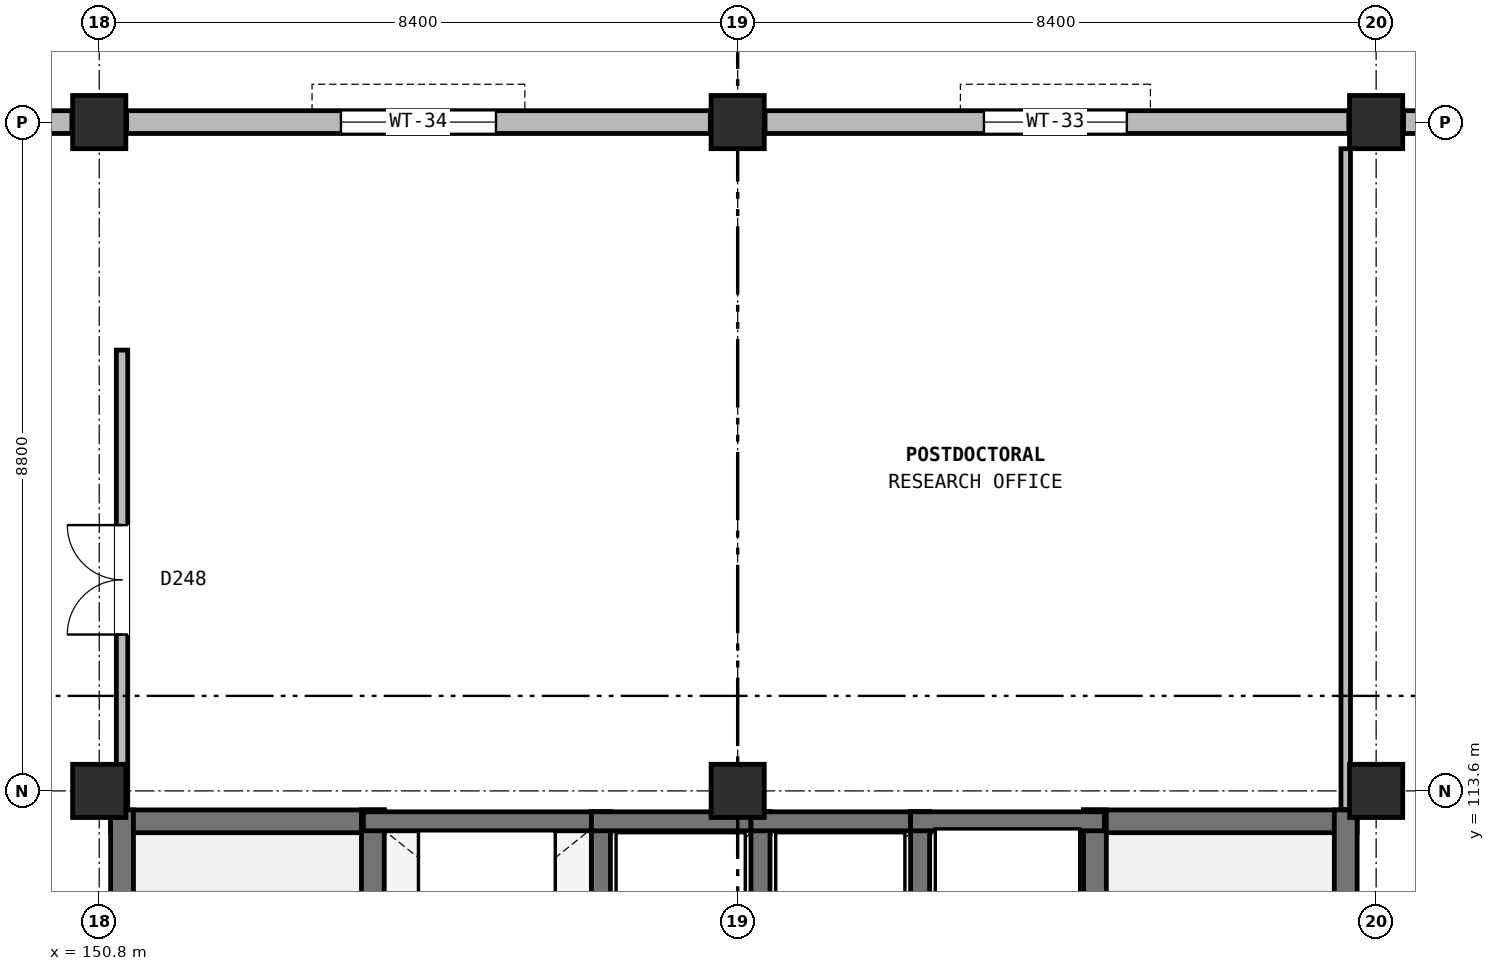
"""IFC4 building model, lengths in metres.
Left out: names, types, materials, properties, quantities, classifications, styles, units other than length and angle.
Written with IfcOpenShell. Run it as: python <this file> out.ifc"""

import sys

from ifc_helpers import new_model, si_unit, direction, frame, frame_2d, origin, origin_2d, place, context, subcontext, project, spatial, rectangle, extrude, element, fill, save


model = new_model("IFC4")
c1 = context("Model", 3, precision=1e-05, world=origin(), true_north=direction((0.0, 1.0)))
c2 = subcontext(c1, "Body", "Model", "MODEL_VIEW")
j1 = project(units=[si_unit("LENGTHUNIT", "METRE"), si_unit("PLANEANGLEUNIT", "RADIAN")], contexts=[c1])
p1 = place(None, origin())
s1 = spatial("IfcSite", under=j1, at=p1, CompositionType="ELEMENT")
p2 = place(p1, origin())
s2 = spatial("IfcBuilding", under=s1, at=p2, CompositionType="ELEMENT")
p3 = place(p2, frame((0.0, 0.0, 40.6)))
s3 = spatial("IfcBuildingStorey", under=s2, at=p3, CompositionType="ELEMENT", Elevation=40.6)
for number, where, z_axis, x_axis in (
    (1, (150.8, 113.6, 0.0), (0.0, 0.0, 1.0), (1.0, 0.0, 0.0)),
    (2, (150.8, 122.4, 0.0), (0.0, 0.0, 1.0), (1.0, 0.0, 0.0)),
    (3, (159.2, 113.6, 0.0), (0.0, 0.0, 1.0), (1.0, 0.0, 0.0)),
    (4, (159.2, 122.4, 0.0), (0.0, 0.0, 1.0), (1.0, 0.0, 0.0)),
    (5, (167.6, 113.6, 0.0), (0.0, 0.0, 1.0), (1.0, 0.0, 0.0)),
    (6, (167.6, 122.4, 0.0), (0.0, 0.0, 1.0), (1.0, 0.0, 0.0)),
):
    element("IfcColumn", number, at=place(p3, frame(where, z_axis=z_axis, x_axis=x_axis)), inside=s3, PredefinedType="COLUMN", context=c2, shape_type="SweptSolid", body=[
        extrude(rectangle(XDim=0.7, YDim=0.7, at=origin_2d()), origin(), (0.0, 0.0, 1.0), 3.8),
    ])
p4 = place(p3, frame((175.64, 122.4, 0.0), z_axis=(0.0, 0.0, 1.0), x_axis=(-1.0, 0.0, 0.0)))
e7 = element("IfcWall", 7, at=p4, inside=s3, PredefinedType="SOLIDWALL", context=c2, shape_type="SweptSolid", body=[
    extrude(rectangle(XDim=7.68, YDim=0.3, at=frame_2d((3.84, 0.0))), origin(), (0.0, 0.0, 1.0), 3.05),
])
p5 = place(p4, frame((1.16, 0.0, 0.9)))
e8 = element("IfcOpeningElement", 8, at=p5, cuts=e7, PredefinedType="OPENING", context=c2, shape_type="SweptSolid", body=[
    extrude(rectangle(XDim=1.72, YDim=1.92, at=frame_2d((0.86, 0.96))), frame((0.0, 0.16, 0.0), z_axis=(0.0, -1.0, 0.0), x_axis=(1.0, 0.0, 0.0)), (0.0, 0.0, 1.0), 0.32),
])
p6 = place(p3, frame((167.24, 122.4, 0.0), z_axis=(0.0, 0.0, 1.0), x_axis=(-1.0, 0.0, 0.0)))
e9 = element("IfcWall", 9, at=p6, inside=s3, PredefinedType="SOLIDWALL", context=c2, shape_type="SweptSolid", body=[
    extrude(rectangle(XDim=7.68, YDim=0.3, at=frame_2d((3.84, 0.0))), origin(), (0.0, 0.0, 1.0), 3.05),
])
p7 = place(p6, frame((2.92, 0.0, 0.9)))
e10 = element("IfcOpeningElement", 10, at=p7, cuts=e9, PredefinedType="OPENING", context=c2, shape_type="SweptSolid", body=[
    extrude(rectangle(XDim=1.88, YDim=1.96, at=frame_2d((0.94, 0.98))), frame((0.0, 0.16, 0.0), z_axis=(0.0, -1.0, 0.0), x_axis=(1.0, 0.0, 0.0)), (0.0, 0.0, 1.0), 0.32),
])
p8 = place(p3, frame((158.84, 122.4, 0.0), z_axis=(0.0, 0.0, 1.0), x_axis=(-1.0, 0.0, 0.0)))
e11 = element("IfcWall", 11, at=p8, inside=s3, PredefinedType="SOLIDWALL", context=c2, shape_type="SweptSolid", body=[
    extrude(rectangle(XDim=7.68, YDim=0.3, at=frame_2d((3.84, 0.0))), origin(), (0.0, 0.0, 1.0), 3.05),
])
p9 = place(p8, frame((2.82, 0.0, 0.9)))
e12 = element("IfcOpeningElement", 12, at=p9, cuts=e11, PredefinedType="OPENING", context=c2, shape_type="SweptSolid", body=[
    extrude(rectangle(XDim=2.04, YDim=1.98, at=frame_2d((1.02, 0.99))), frame((0.0, 0.16, 0.0), z_axis=(0.0, -1.0, 0.0), x_axis=(1.0, 0.0, 0.0)), (0.0, 0.0, 1.0), 0.32),
])
p10 = place(p3, frame((150.44, 122.4, 0.0), z_axis=(0.0, 0.0, 1.0), x_axis=(-1.0, 0.0, 0.0)))
e13 = element("IfcWall", 13, at=p10, inside=s3, PredefinedType="SOLIDWALL", context=c2, shape_type="SweptSolid", body=[
    extrude(rectangle(XDim=7.68, YDim=0.3, at=frame_2d((3.84, 0.0))), origin(), (0.0, 0.0, 1.0), 3.05),
])
p11 = place(p10, frame((2.54, 0.0, 0.9)))
e14 = element("IfcOpeningElement", 14, at=p11, cuts=e13, PredefinedType="OPENING", context=c2, shape_type="SweptSolid", body=[
    extrude(rectangle(XDim=2.6, YDim=2.0, at=frame_2d((1.3, 1.0))), frame((0.0, 0.16, 0.0), z_axis=(0.0, -1.0, 0.0), x_axis=(1.0, 0.0, 0.0)), (0.0, 0.0, 1.0), 0.32),
])
p12 = place(p3, frame((150.95, 113.2, 0.0), z_axis=(0.0, 0.0, 1.0), x_axis=(1.0, 0.0, 0.0)))
e15 = element("IfcWall", 15, at=p12, inside=s3, PredefinedType="SHEAR", context=c2, shape_type="SweptSolid", body=[
    extrude(rectangle(XDim=3.6, YDim=0.3, at=frame_2d((1.8, 0.0))), origin(), (0.0, 0.0, 1.0), 3.8),
])
p13 = place(p3, frame((151.1, 105.05, 0.0), z_axis=(0.0, 0.0, 1.0), x_axis=(0.0, 1.0, 0.0)))
e16 = element("IfcWall", 16, at=p13, inside=s3, PredefinedType="SHEAR", context=c2, shape_type="SweptSolid", body=[
    extrude(rectangle(XDim=8.3, YDim=0.3, at=frame_2d((4.15, 0.0))), origin(), (0.0, 0.0, 1.0), 3.8),
])
p14 = place(p3, frame((154.4, 105.05, 0.0), z_axis=(0.0, 0.0, 1.0), x_axis=(0.0, 1.0, 0.0)))
e17 = element("IfcWall", 17, at=p14, inside=s3, PredefinedType="SHEAR", context=c2, shape_type="SweptSolid", body=[
    extrude(rectangle(XDim=8.3, YDim=0.3, at=frame_2d((4.15, 0.0))), origin(), (0.0, 0.0, 1.0), 3.8),
])
p15 = place(p14, frame((0.45, 0.0, 0.0)))
e18 = element("IfcOpeningElement", 18, at=p15, cuts=e17, PredefinedType="OPENING", context=c2, shape_type="SweptSolid", body=[
    extrude(rectangle(XDim=1.1, YDim=2.2, at=frame_2d((0.55, 1.1))), frame((0.0, 0.16, 0.0), z_axis=(0.0, -1.0, 0.0), x_axis=(1.0, 0.0, 0.0)), (0.0, 0.0, 1.0), 0.32),
])
p16 = place(p3, frame((163.75, 113.2, 0.0), z_axis=(0.0, 0.0, 1.0), x_axis=(1.0, 0.0, 0.0)))
e19 = element("IfcWall", 19, at=p16, inside=s3, PredefinedType="SHEAR", context=c2, shape_type="SweptSolid", body=[
    extrude(rectangle(XDim=3.6, YDim=0.3, at=frame_2d((1.8, 0.0))), origin(), (0.0, 0.0, 1.0), 3.8),
])
for number, where, z_axis, x_axis in (
    (20, (163.9, 105.05, 0.0), (0.0, 0.0, 1.0), (0.0, 1.0, 0.0)),
    (21, (167.2, 105.05, 0.0), (0.0, 0.0, 1.0), (0.0, 1.0, 0.0)),
):
    element("IfcWall", number, at=place(p3, frame(where, z_axis=z_axis, x_axis=x_axis)), inside=s3, PredefinedType="SHEAR", context=c2, shape_type="SweptSolid", body=[
        extrude(rectangle(XDim=8.3, YDim=0.3, at=frame_2d((4.15, 0.0))), origin(), (0.0, 0.0, 1.0), 3.8),
    ])
p17 = place(p3, frame((154.275, 113.2, 0.0), z_axis=(0.0, 0.0, 1.0), x_axis=(1.0, 0.0, 0.0)))
e22 = element("IfcWall", 22, at=p17, inside=s3, PredefinedType="SOLIDWALL", context=c2, shape_type="SweptSolid", body=[
    extrude(rectangle(XDim=3.25, YDim=0.25, at=frame_2d((1.625, 0.0))), origin(), (0.0, 0.0, 1.0), 3.48),
])
p18 = place(p3, frame((157.4, 110.675, 0.0), z_axis=(0.0, 0.0, 1.0), x_axis=(0.0, 1.0, 0.0)))
e23 = element("IfcWall", 23, at=p18, inside=s3, PredefinedType="SOLIDWALL", context=c2, shape_type="SweptSolid", body=[
    extrude(rectangle(XDim=2.65, YDim=0.25, at=frame_2d((1.325, 0.0))), origin(), (0.0, 0.0, 1.0), 3.48),
])
p19 = place(p3, frame((157.275, 113.2, 0.0), z_axis=(0.0, 0.0, 1.0), x_axis=(1.0, 0.0, 0.0)))
e24 = element("IfcWall", 24, at=p19, inside=s3, PredefinedType="SOLIDWALL", context=c2, shape_type="SweptSolid", body=[
    extrude(rectangle(XDim=2.35, YDim=0.25, at=frame_2d((1.175, 0.0))), origin(), (0.0, 0.0, 1.0), 3.48),
])
p20 = place(p3, frame((159.5, 110.675, 0.0), z_axis=(0.0, 0.0, 1.0), x_axis=(0.0, 1.0, 0.0)))
e25 = element("IfcWall", 25, at=p20, inside=s3, PredefinedType="SOLIDWALL", context=c2, shape_type="SweptSolid", body=[
    extrude(rectangle(XDim=2.65, YDim=0.25, at=frame_2d((1.325, 0.0))), origin(), (0.0, 0.0, 1.0), 3.48),
])
p21 = place(p3, frame((159.375, 113.2, 0.0), z_axis=(0.0, 0.0, 1.0), x_axis=(1.0, 0.0, 0.0)))
e26 = element("IfcWall", 26, at=p21, inside=s3, PredefinedType="SOLIDWALL", context=c2, shape_type="SweptSolid", body=[
    extrude(rectangle(XDim=2.35, YDim=0.25, at=frame_2d((1.175, 0.0))), origin(), (0.0, 0.0, 1.0), 3.48),
])
p22 = place(p3, frame((161.6, 110.675, 0.0), z_axis=(0.0, 0.0, 1.0), x_axis=(0.0, 1.0, 0.0)))
e27 = element("IfcWall", 27, at=p22, inside=s3, PredefinedType="SOLIDWALL", context=c2, shape_type="SweptSolid", body=[
    extrude(rectangle(XDim=2.65, YDim=0.25, at=frame_2d((1.325, 0.0))), origin(), (0.0, 0.0, 1.0), 3.48),
])
p23 = place(p3, frame((161.475, 113.2, 0.0), z_axis=(0.0, 0.0, 1.0), x_axis=(1.0, 0.0, 0.0)))
e28 = element("IfcWall", 28, at=p23, inside=s3, PredefinedType="SOLIDWALL", context=c2, shape_type="SweptSolid", body=[
    extrude(rectangle(XDim=2.55, YDim=0.25, at=frame_2d((1.275, 0.0))), origin(), (0.0, 0.0, 1.0), 3.48),
])
p24 = place(p3, frame((151.1, 113.355, 0.0), z_axis=(0.0, 0.0, 1.0), x_axis=(0.0, 1.0, 0.0)))
e29 = element("IfcWall", 29, at=p24, inside=s3, PredefinedType="PARTITIONING", context=c2, shape_type="SweptSolid", body=[
    extrude(rectangle(XDim=6.045, YDim=0.15, at=frame_2d((3.022, 0.0))), origin(), (0.0, 0.0, 1.0), 3.045),
])
p25 = place(p24, frame((2.302, 0.0, 0.0)))
e30 = element("IfcOpeningElement", 30, at=p25, cuts=e29, PredefinedType="OPENING", context=c2, shape_type="SweptSolid", body=[
    extrude(rectangle(XDim=1.44, YDim=2.26, at=frame_2d((0.72, 1.13))), frame((0.0, 0.085, 0.0), z_axis=(0.0, -1.0, 0.0), x_axis=(1.0, 0.0, 0.0)), (0.0, 0.0, 1.0), 0.17),
])
p26 = place(p3, frame((167.2, 113.355, 0.0), z_axis=(0.0, 0.0, 1.0), x_axis=(0.0, 1.0, 0.0)))
e31 = element("IfcWall", 31, at=p26, inside=s3, PredefinedType="PARTITIONING", context=c2, shape_type="SweptSolid", body=[
    extrude(rectangle(XDim=8.695, YDim=0.125, at=frame_2d((4.348, 0.0))), origin(), (0.0, 0.0, 1.0), 3.045),
])
p27 = place(p7, origin())
e32 = element("IfcWindow", 32, at=p27, inside=s3, PartitioningType="SINGLE_PANEL", PredefinedType="WINDOW", context=c2, shape_type="SweptSolid", body=[
    extrude(rectangle(XDim=1.88, YDim=1.96, at=frame_2d((0.94, 0.98))), frame((0.0, 0.03, 0.0), z_axis=(0.0, -1.0, 0.0), x_axis=(1.0, 0.0, 0.0)), (0.0, 0.0, 1.0), 0.06),
])
fill(e10, e32)
p28 = place(p9, origin())
e33 = element("IfcWindow", 33, at=p28, inside=s3, PartitioningType="SINGLE_PANEL", PredefinedType="WINDOW", context=c2, shape_type="SweptSolid", body=[
    extrude(rectangle(XDim=2.04, YDim=1.98, at=frame_2d((1.02, 0.99))), frame((0.0, 0.03, 0.0), z_axis=(0.0, -1.0, 0.0), x_axis=(1.0, 0.0, 0.0)), (0.0, 0.0, 1.0), 0.06),
])
fill(e12, e33)
p29 = place(p25, origin())
e34 = element("IfcDoor", 34, at=p29, inside=s3, OperationType="DOUBLE_DOOR_SINGLE_SWING", PredefinedType="DOOR", context=c2, shape_type="SweptSolid", body=[
    extrude(rectangle(XDim=1.44, YDim=2.26, at=frame_2d((0.72, 1.13))), frame((0.0, 0.025, 0.0), z_axis=(0.0, -1.0, 0.0), x_axis=(1.0, 0.0, 0.0)), (0.0, 0.0, 1.0), 0.05),
])
fill(e30, e34)
save(model, sys.argv[1])
